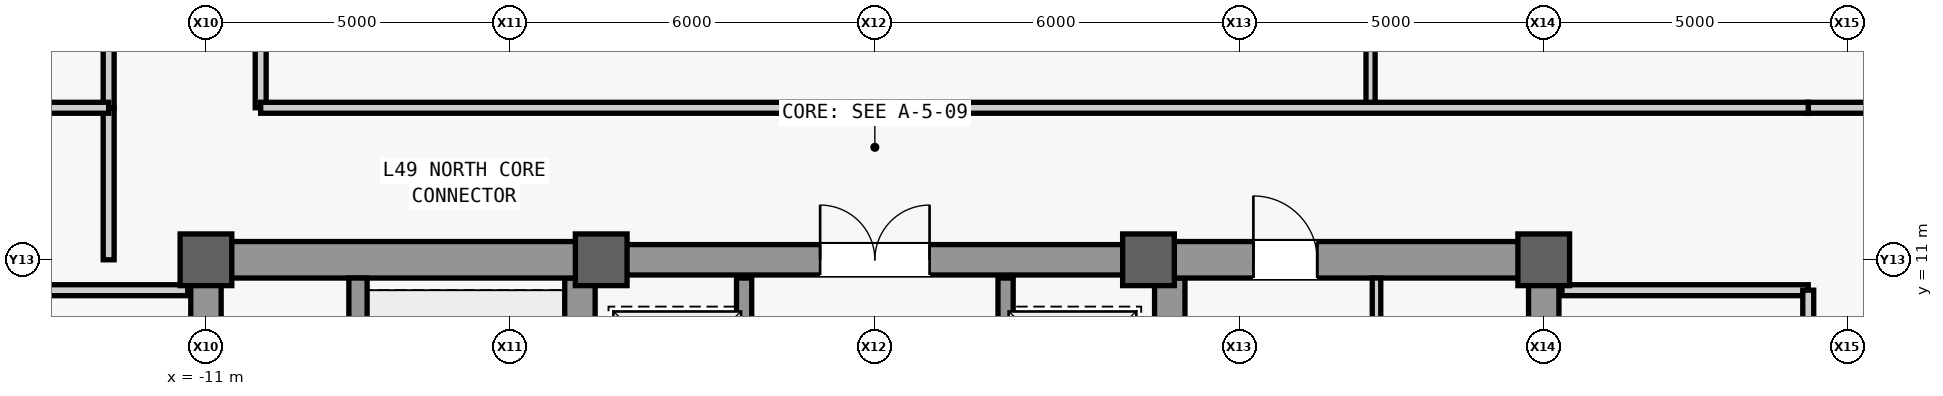
"""IFC4 building model, lengths in metres.
Left out: names, types, materials, properties, quantities, classifications, styles, units other than length and angle.
Written with IfcOpenShell. Run it as: python <this file> out.ifc"""

import sys

from ifc_helpers import new_model, si_unit, direction, frame, frame_2d, origin, origin_2d, place, context, subcontext, project, spatial, rectangle, extrude, source, transform, mapped, element, fill, save


model = new_model("IFC4")
c1 = context("Model", 3, precision=1e-05, world=origin(), true_north=direction((0.0, 1.0)))
c2 = subcontext(c1, "Body", "Model", "MODEL_VIEW")
j1 = project(units=[si_unit("LENGTHUNIT", "METRE"), si_unit("PLANEANGLEUNIT", "RADIAN")], contexts=[c1])
p1 = place(None, origin())
s1 = spatial("IfcSite", under=j1, at=p1, CompositionType="ELEMENT")
p2 = place(p1, origin())
s2 = spatial("IfcBuilding", under=s1, at=p2, CompositionType="ELEMENT")
p3 = place(p2, frame((0.0, 0.0, 211.1)))
s3 = spatial("IfcBuildingStorey", under=s2, at=p3, CompositionType="ELEMENT", Elevation=211.1)
m1 = source(origin(), c2, "Body", "SweptSolid", [
    extrude(rectangle(XDim=22.0, YDim=0.5, at=frame_2d((11.0, 0.0))), origin(), (0.0, 0.0, 1.0), 3.78),
])
p4 = place(p3, frame((-11.0, -11.0, 0.0), z_axis=(0.0, 0.0, 1.0), x_axis=(0.0, 1.0, 0.0)))
e1 = element("IfcWall", 1, at=p4, inside=s3, PredefinedType="SHEAR", context=c2, shape_type="MappedRepresentation", body=[
    mapped(m1, transform((0.0, 0.0, 0.0), scale=1.0)),
])
m2 = source(origin(), c2, "Body", "SweptSolid", [
    extrude(rectangle(XDim=1.1, YDim=2.2, at=frame_2d((0.55, 1.1))), frame((0.0, 0.26, 0.0), z_axis=(0.0, -1.0, 0.0), x_axis=(1.0, 0.0, 0.0)), (0.0, 0.0, 1.0), 0.52),
])
p5 = place(p4, frame((0.8, 0.0, 0.0)))
e2 = element("IfcOpeningElement", 2, at=p5, cuts=e1, PredefinedType="OPENING", context=c2, shape_type="MappedRepresentation", body=[
    mapped(m2, transform((0.0, 0.0, 0.0), scale=1.0)),
])
p6 = place(p4, frame((12.5, 0.0, 0.0)))
e3 = element("IfcOpeningElement", 3, at=p6, cuts=e1, PredefinedType="OPENING", context=c2, shape_type="MappedRepresentation", body=[
    mapped(m2, transform((0.0, 0.0, 0.0), scale=1.0)),
])
m3 = source(origin(), c2, "Body", "SweptSolid", [
    extrude(rectangle(XDim=0.9, YDim=2.15, at=frame_2d((0.45, 1.075))), frame((0.0, 0.26, 0.0), z_axis=(0.0, -1.0, 0.0), x_axis=(1.0, 0.0, 0.0)), (0.0, 0.0, 1.0), 0.52),
])
p7 = place(p4, frame((6.85, 0.0, 0.0)))
e4 = element("IfcOpeningElement", 4, at=p7, cuts=e1, PredefinedType="OPENING", context=c2, shape_type="MappedRepresentation", body=[
    mapped(m3, transform((0.0, 0.0, 0.0), scale=1.0)),
])
m4 = source(origin(), c2, "Body", "SweptSolid", [
    extrude(rectangle(XDim=1.3, YDim=2.3, at=frame_2d((0.65, 1.15))), frame((0.0, 0.26, 0.0), z_axis=(0.0, -1.0, 0.0), x_axis=(1.0, 0.0, 0.0)), (0.0, 0.0, 1.0), 0.52),
])
p8 = place(p4, frame((2.7, 0.0, 0.0)))
e5 = element("IfcOpeningElement", 5, at=p8, cuts=e1, PredefinedType="OPENING", context=c2, shape_type="MappedRepresentation", body=[
    mapped(m4, transform((0.0, 0.0, 0.0), scale=1.0)),
])
p9 = place(p3, frame((11.0, -11.0, 0.0), z_axis=(0.0, 0.0, 1.0), x_axis=(0.0, 1.0, 0.0)))
e6 = element("IfcWall", 6, at=p9, inside=s3, PredefinedType="SHEAR", context=c2, shape_type="MappedRepresentation", body=[
    mapped(m1, transform((0.0, 0.0, 0.0), scale=1.0)),
])
p10 = place(p9, frame((0.8, 0.0, 0.0)))
e7 = element("IfcOpeningElement", 7, at=p10, cuts=e6, PredefinedType="OPENING", context=c2, shape_type="MappedRepresentation", body=[
    mapped(m2, transform((0.0, 0.0, 0.0), scale=1.0)),
])
p11 = place(p9, frame((6.2, 0.0, 0.0)))
e8 = element("IfcOpeningElement", 8, at=p11, cuts=e6, PredefinedType="OPENING", context=c2, shape_type="MappedRepresentation", body=[
    mapped(m3, transform((0.0, 0.0, 0.0), scale=1.0)),
])
p12 = place(p9, frame((8.05, 0.0, 0.0)))
e9 = element("IfcOpeningElement", 9, at=p12, cuts=e6, PredefinedType="OPENING", context=c2, shape_type="MappedRepresentation", body=[
    mapped(m3, transform((0.0, 0.0, 0.0), scale=1.0)),
])
p13 = place(p9, frame((2.7, 0.0, 0.0)))
e10 = element("IfcOpeningElement", 10, at=p13, cuts=e6, PredefinedType="OPENING", context=c2, shape_type="MappedRepresentation", body=[
    mapped(m4, transform((0.0, 0.0, 0.0), scale=1.0)),
])
p14 = place(p9, frame((13.35, 0.0, 0.0)))
e11 = element("IfcOpeningElement", 11, at=p14, cuts=e6, PredefinedType="OPENING", context=c2, shape_type="MappedRepresentation", body=[
    mapped(m4, transform((0.0, 0.0, 0.0), scale=1.0)),
])
m5 = source(origin(), c2, "Body", "SweptSolid", [
    extrude(rectangle(XDim=21.4, YDim=0.5, at=frame_2d((10.7, 0.0))), origin(), (0.0, 0.0, 1.0), 3.78),
])
for number, where, z_axis, x_axis in (
    (12, (-4.85, -10.7, 0.0), (0.0, 0.0, 1.0), (0.0, 1.0, 0.0)),
    (13, (4.85, -10.7, 0.0), (0.0, 0.0, 1.0), (0.0, 1.0, 0.0)),
):
    element("IfcWall", number, at=place(p3, frame(where, z_axis=z_axis, x_axis=x_axis)), inside=s3, PredefinedType="SHEAR", context=c2, shape_type="MappedRepresentation", body=[
        mapped(m5, transform((0.0, 0.0, 0.0), scale=1.0)),
    ])
m6 = source(origin(), c2, "Body", "SweptSolid", [
    extrude(rectangle(XDim=5.9, YDim=0.6, at=frame_2d((2.95, 0.0))), origin(), (0.0, 0.0, 1.0), 3.78),
])
p15 = place(p3, frame((-10.75, 11.0, 0.0), z_axis=(0.0, 0.0, 1.0), x_axis=(1.0, 0.0, 0.0)))
e14 = element("IfcWall", 14, at=p15, inside=s3, PredefinedType="SHEAR", context=c2, shape_type="MappedRepresentation", body=[
    mapped(m6, transform((0.0, 0.0, 0.0), scale=1.0)),
])
p16 = place(p3, frame((4.85, 11.0, 0.0), z_axis=(0.0, 0.0, 1.0), x_axis=(1.0, 0.0, 0.0)))
e15 = element("IfcWall", 15, at=p16, inside=s3, PredefinedType="SHEAR", context=c2, shape_type="MappedRepresentation", body=[
    mapped(m6, transform((0.0, 0.0, 0.0), scale=1.0)),
])
m7 = source(origin(), c2, "Body", "SweptSolid", [
    extrude(rectangle(XDim=1.05, YDim=2.2, at=frame_2d((0.525, 1.1))), frame((0.0, 0.31, 0.0), z_axis=(0.0, -1.0, 0.0), x_axis=(1.0, 0.0, 0.0)), (0.0, 0.0, 1.0), 0.62),
])
p17 = place(p16, frame((1.375, 0.0, 0.0)))
e16 = element("IfcOpeningElement", 16, at=p17, cuts=e15, PredefinedType="OPENING", context=c2, shape_type="MappedRepresentation", body=[
    mapped(m7, transform((0.0, 0.0, 0.0), scale=1.0)),
])
m8 = source(origin(), c2, "Body", "SweptSolid", [
    extrude(rectangle(XDim=9.2, YDim=0.5, at=frame_2d((4.6, 0.0))), origin(), (0.0, 0.0, 1.0), 3.78),
])
p18 = place(p3, frame((-4.6, 11.0, 0.0), z_axis=(0.0, 0.0, 1.0), x_axis=(1.0, 0.0, 0.0)))
e17 = element("IfcWall", 17, at=p18, inside=s3, PredefinedType="SHEAR", context=c2, shape_type="MappedRepresentation", body=[
    mapped(m8, transform((0.0, 0.0, 0.0), scale=1.0)),
])
m9 = source(origin(), c2, "Body", "SweptSolid", [
    extrude(rectangle(XDim=1.8, YDim=2.25, at=frame_2d((0.9, 1.125))), frame((0.0, 0.26, 0.0), z_axis=(0.0, -1.0, 0.0), x_axis=(1.0, 0.0, 0.0)), (0.0, 0.0, 1.0), 0.52),
])
p19 = place(p18, frame((3.7, 0.0, 0.0)))
e18 = element("IfcOpeningElement", 18, at=p19, cuts=e17, PredefinedType="OPENING", context=c2, shape_type="MappedRepresentation", body=[
    mapped(m9, transform((0.0, 0.0, 0.0), scale=1.0)),
])
m10 = source(origin(), c2, "Body", "SweptSolid", [
    extrude(rectangle(XDim=0.85, YDim=0.85, at=origin_2d()), origin(), (0.0, 0.0, 1.0), 4.0),
])
for number, where, z_axis, x_axis in (
    (19, (-11.0, 11.0, 0.0), (0.0, 0.0, 1.0), (1.0, 0.0, 0.0)),
    (20, (-4.5, 11.0, 0.0), (0.0, 0.0, 1.0), (1.0, 0.0, 0.0)),
    (21, (4.5, 11.0, 0.0), (0.0, 0.0, 1.0), (1.0, 0.0, 0.0)),
    (22, (11.0, 11.0, 0.0), (0.0, 0.0, 1.0), (1.0, 0.0, 0.0)),
):
    element("IfcColumn", number, at=place(p3, frame(where, z_axis=z_axis, x_axis=x_axis)), inside=s3, PredefinedType="COLUMN", context=c2, shape_type="MappedRepresentation", body=[
        mapped(m10, transform((0.0, 0.0, 0.0), scale=1.0)),
    ])
m11 = source(origin(), c2, "Body", "SweptSolid", [
    extrude(rectangle(XDim=7.75, YDim=0.3, at=frame_2d((3.875, 0.0))), origin(), (0.0, 0.0, 1.0), 3.78),
])
p20 = place(p3, frame((-8.5, 2.95, 0.0), z_axis=(0.0, 0.0, 1.0), x_axis=(0.0, 1.0, 0.0)))
e23 = element("IfcWall", 23, at=p20, inside=s3, PredefinedType="SHEAR", context=c2, shape_type="MappedRepresentation", body=[
    mapped(m11, transform((0.0, 0.0, 0.0), scale=1.0)),
])
m12 = source(origin(), c2, "Body", "SweptSolid", [
    extrude(rectangle(XDim=9.4, YDim=0.14, at=frame_2d((4.7, 0.0))), origin(), (0.0, 0.0, 1.0), 3.78),
])
p21 = place(p3, frame((8.25, 1.3, 0.0), z_axis=(0.0, 0.0, 1.0), x_axis=(0.0, 1.0, 0.0)))
e24 = element("IfcWall", 24, at=p21, inside=s3, PredefinedType="PARTITIONING", context=c2, shape_type="MappedRepresentation", body=[
    mapped(m12, transform((0.0, 0.0, 0.0), scale=1.0)),
])
m13 = source(origin(), c2, "Body", "SweptSolid", [
    extrude(rectangle(XDim=4.05, YDim=0.18, at=frame_2d((2.025, 0.0))), origin(), (0.0, 0.0, 1.0), 3.78),
])
for number, where, z_axis, x_axis in (
    (25, (-15.35, 10.5, 0.0), (0.0, 0.0, 1.0), (1.0, 0.0, 0.0)),
    (26, (11.3, 10.5, 0.0), (0.0, 0.0, 1.0), (1.0, 0.0, 0.0)),
):
    element("IfcWall", number, at=place(p3, frame(where, z_axis=z_axis, x_axis=x_axis)), inside=s3, PredefinedType="PARTITIONING", context=c2, shape_type="MappedRepresentation", body=[
        mapped(m13, transform((0.0, 0.0, 0.0), scale=1.0)),
    ])
m14 = source(origin(), c2, "Body", "SweptSolid", [
    extrude(rectangle(XDim=16.6, YDim=0.18, at=frame_2d((8.3, 0.0))), origin(), (0.0, 0.0, 1.0), 3.78),
])
p22 = place(p3, frame((15.35, -6.1, 0.0), z_axis=(0.0, 0.0, 1.0), x_axis=(0.0, 1.0, 0.0)))
e27 = element("IfcWall", 27, at=p22, inside=s3, PredefinedType="PARTITIONING", context=c2, shape_type="MappedRepresentation", body=[
    mapped(m14, transform((0.0, 0.0, 0.0), scale=1.0)),
])
m15 = source(origin(), c2, "Body", "SweptSolid", [
    extrude(rectangle(XDim=1.8, YDim=2.25, at=frame_2d((0.9, 1.125))), frame((0.0, 0.1, 0.0), z_axis=(0.0, -1.0, 0.0), x_axis=(1.0, 0.0, 0.0)), (0.0, 0.0, 1.0), 0.2),
])
p23 = place(p22, frame((2.7, 0.0, 0.0)))
e28 = element("IfcOpeningElement", 28, at=p23, cuts=e27, PredefinedType="OPENING", context=c2, shape_type="MappedRepresentation", body=[
    mapped(m15, transform((0.0, 0.0, 0.0), scale=1.0)),
])
p24 = place(p22, frame((13.0, 0.0, 0.0)))
e29 = element("IfcOpeningElement", 29, at=p24, cuts=e27, PredefinedType="OPENING", context=c2, shape_type="MappedRepresentation", body=[
    mapped(m15, transform((0.0, 0.0, 0.0), scale=1.0)),
])
m16 = source(origin(), c2, "Body", "SweptSolid", [
    extrude(rectangle(XDim=5.4, YDim=0.25, at=frame_2d((2.7, 0.0))), origin(), (0.0, 0.0, 1.0), 3.78),
])
p25 = place(p3, frame((-2.15, 5.3, 0.0), z_axis=(0.0, 0.0, 1.0), x_axis=(0.0, 1.0, 0.0)))
e30 = element("IfcWall", 30, at=p25, inside=s3, PredefinedType="SHEAR", context=c2, shape_type="MappedRepresentation", body=[
    mapped(m16, transform((0.0, 0.0, 0.0), scale=1.0)),
])
m17 = source(origin(), c2, "Body", "SweptSolid", [
    extrude(rectangle(XDim=1.2, YDim=2.3, at=frame_2d((0.6, 1.15))), frame((0.0, 0.135, 0.0), z_axis=(0.0, -1.0, 0.0), x_axis=(1.0, 0.0, 0.0)), (0.0, 0.0, 1.0), 0.27),
])
p26 = place(p25, frame((3.3, 0.0, 0.0)))
e31 = element("IfcOpeningElement", 31, at=p26, cuts=e30, PredefinedType="OPENING", context=c2, shape_type="MappedRepresentation", body=[
    mapped(m17, transform((0.0, 0.0, 0.0), scale=1.0)),
])
p27 = place(p25, frame((0.9, 0.0, 0.0)))
e32 = element("IfcOpeningElement", 32, at=p27, cuts=e30, PredefinedType="OPENING", context=c2, shape_type="MappedRepresentation", body=[
    mapped(m17, transform((0.0, 0.0, 0.0), scale=1.0)),
])
p28 = place(p3, frame((2.15, 5.3, 0.0), z_axis=(0.0, 0.0, 1.0), x_axis=(0.0, 1.0, 0.0)))
e33 = element("IfcWall", 33, at=p28, inside=s3, PredefinedType="SHEAR", context=c2, shape_type="MappedRepresentation", body=[
    mapped(m16, transform((0.0, 0.0, 0.0), scale=1.0)),
])
p29 = place(p28, frame((3.3, 0.0, 0.0)))
e34 = element("IfcOpeningElement", 34, at=p29, cuts=e33, PredefinedType="OPENING", context=c2, shape_type="MappedRepresentation", body=[
    mapped(m17, transform((0.0, 0.0, 0.0), scale=1.0)),
])
p30 = place(p28, frame((0.9, 0.0, 0.0)))
e35 = element("IfcOpeningElement", 35, at=p30, cuts=e33, PredefinedType="OPENING", context=c2, shape_type="MappedRepresentation", body=[
    mapped(m17, transform((0.0, 0.0, 0.0), scale=1.0)),
])
m18 = source(origin(), c2, "Body", "SweptSolid", [
    extrude(rectangle(XDim=2.45, YDim=0.18, at=frame_2d((1.225, 0.0))), origin(), (0.0, 0.0, 1.0), 3.78),
])
p31 = place(p3, frame((15.35, 13.5, 0.0), z_axis=(0.0, 0.0, 1.0), x_axis=(1.0, 0.0, 0.0)))
e36 = element("IfcWall", 36, at=p31, inside=s3, PredefinedType="PARTITIONING", context=c2, shape_type="MappedRepresentation", body=[
    mapped(m18, transform((0.0, 0.0, 0.0), scale=1.0)),
])
m19 = source(origin(), c2, "Body", "SweptSolid", [
    extrude(rectangle(XDim=2.5, YDim=0.18, at=frame_2d((1.25, 0.0))), origin(), (0.0, 0.0, 1.0), 3.78),
])
p32 = place(p3, frame((-12.6, 11.0, 0.0), z_axis=(0.0, 0.0, 1.0), x_axis=(0.0, 1.0, 0.0)))
e37 = element("IfcWall", 37, at=p32, inside=s3, PredefinedType="PARTITIONING", context=c2, shape_type="MappedRepresentation", body=[
    mapped(m19, transform((0.0, 0.0, 0.0), scale=1.0)),
])
m20 = source(origin(), c2, "Body", "SweptSolid", [
    extrude(rectangle(XDim=16.5, YDim=0.18, at=frame_2d((8.25, 0.0))), origin(), (0.0, 0.0, 1.0), 3.78),
])
p33 = place(p3, frame((-12.6, 13.5, 0.0), z_axis=(0.0, 0.0, 1.0), x_axis=(0.0, 1.0, 0.0)))
e38 = element("IfcWall", 38, at=p33, inside=s3, PredefinedType="PARTITIONING", context=c2, shape_type="MappedRepresentation", body=[
    mapped(m20, transform((0.0, 0.0, 0.0), scale=1.0)),
])
m21 = source(origin(), c2, "Body", "SweptSolid", [
    extrude(rectangle(XDim=1.05, YDim=2.2, at=frame_2d((0.525, 1.1))), frame((0.0, 0.1, 0.0), z_axis=(0.0, -1.0, 0.0), x_axis=(1.0, 0.0, 0.0)), (0.0, 0.0, 1.0), 0.2),
])
p34 = place(p33, frame((11.85, 0.0, 0.0)))
e39 = element("IfcOpeningElement", 39, at=p34, cuts=e38, PredefinedType="OPENING", context=c2, shape_type="MappedRepresentation", body=[
    mapped(m21, transform((0.0, 0.0, 0.0), scale=1.0)),
])
m22 = source(origin(), c2, "Body", "SweptSolid", [
    extrude(rectangle(XDim=2.75, YDim=0.18, at=frame_2d((1.375, 0.0))), origin(), (0.0, 0.0, 1.0), 3.78),
])
p35 = place(p3, frame((-15.35, 13.5, 0.0), z_axis=(0.0, 0.0, 1.0), x_axis=(1.0, 0.0, 0.0)))
e40 = element("IfcWall", 40, at=p35, inside=s3, PredefinedType="PARTITIONING", context=c2, shape_type="MappedRepresentation", body=[
    mapped(m22, transform((0.0, 0.0, 0.0), scale=1.0)),
])
m23 = source(origin(), c2, "Body", "SweptSolid", [
    extrude(rectangle(XDim=16.5, YDim=0.15, at=frame_2d((8.25, 0.0))), origin(), (0.0, 0.0, 1.0), 3.78),
])
p36 = place(p3, frame((8.152, 13.5, 0.0), z_axis=(0.0, 0.0, 1.0), x_axis=(0.0, 1.0, 0.0)))
e41 = element("IfcWall", 41, at=p36, inside=s3, PredefinedType="PARTITIONING", context=c2, shape_type="MappedRepresentation", body=[
    mapped(m23, transform((0.0, 0.0, 0.0), scale=1.0)),
])
m24 = source(origin(), c2, "Body", "SweptSolid", [
    extrude(rectangle(XDim=0.95, YDim=2.15, at=frame_2d((0.475, 1.075))), frame((0.0, 0.085, 0.0), z_axis=(0.0, -1.0, 0.0), x_axis=(1.0, 0.0, 0.0)), (0.0, 0.0, 1.0), 0.17),
])
p37 = place(p36, frame((11.9, 0.0, 0.0)))
e42 = element("IfcOpeningElement", 42, at=p37, cuts=e41, PredefinedType="OPENING", context=c2, shape_type="MappedRepresentation", body=[
    mapped(m24, transform((0.0, 0.0, 0.0), scale=1.0)),
])
p38 = place(p3, frame((-10.1, 13.5, 0.0), z_axis=(0.0, 0.0, 1.0), x_axis=(0.0, 1.0, 0.0)))
e43 = element("IfcWall", 43, at=p38, inside=s3, PredefinedType="PARTITIONING", context=c2, shape_type="MappedRepresentation", body=[
    mapped(m20, transform((0.0, 0.0, 0.0), scale=1.0)),
])
p39 = place(p38, frame((11.85, 0.0, 0.0)))
e44 = element("IfcOpeningElement", 44, at=p39, cuts=e43, PredefinedType="OPENING", context=c2, shape_type="MappedRepresentation", body=[
    mapped(m21, transform((0.0, 0.0, 0.0), scale=1.0)),
])
m25 = source(origin(), c2, "Body", "SweptSolid", [
    extrude(rectangle(XDim=25.45, YDim=0.18, at=frame_2d((12.725, 0.0))), origin(), (0.0, 0.0, 1.0), 3.78),
])
p40 = place(p3, frame((-10.1, 13.5, 0.0), z_axis=(0.0, 0.0, 1.0), x_axis=(1.0, 0.0, 0.0)))
e45 = element("IfcWall", 45, at=p40, inside=s3, PredefinedType="PARTITIONING", context=c2, shape_type="MappedRepresentation", body=[
    mapped(m25, transform((0.0, 0.0, 0.0), scale=1.0)),
])
m26 = source(origin(), c2, "Body", "SweptSolid", [
    extrude(rectangle(XDim=1.05, YDim=2.2, at=frame_2d((0.525, 1.1))), frame((0.0, 0.025, 0.0), z_axis=(0.0, -1.0, 0.0), x_axis=(1.0, 0.0, 0.0)), (0.0, 0.0, 1.0), 0.05),
])
p41 = place(p17, origin())
e46 = element("IfcDoor", 46, at=p41, inside=s3, OperationType="SINGLE_SWING_LEFT", PredefinedType="DOOR", context=c2, shape_type="MappedRepresentation", body=[
    mapped(m26, transform((0.0, 0.0, 0.0), scale=1.0)),
])
fill(e16, e46)
m27 = source(origin(), c2, "Body", "SweptSolid", [
    extrude(rectangle(XDim=1.8, YDim=2.25, at=frame_2d((0.9, 1.125))), frame((0.0, 0.025, 0.0), z_axis=(0.0, -1.0, 0.0), x_axis=(1.0, 0.0, 0.0)), (0.0, 0.0, 1.0), 0.05),
])
p42 = place(p19, origin())
e47 = element("IfcDoor", 47, at=p42, inside=s3, OperationType="SINGLE_SWING_RIGHT", PredefinedType="DOOR", context=c2, shape_type="MappedRepresentation", body=[
    mapped(m27, transform((0.0, 0.0, 0.0), scale=1.0)),
])
fill(e18, e47)
save(model, sys.argv[1])
